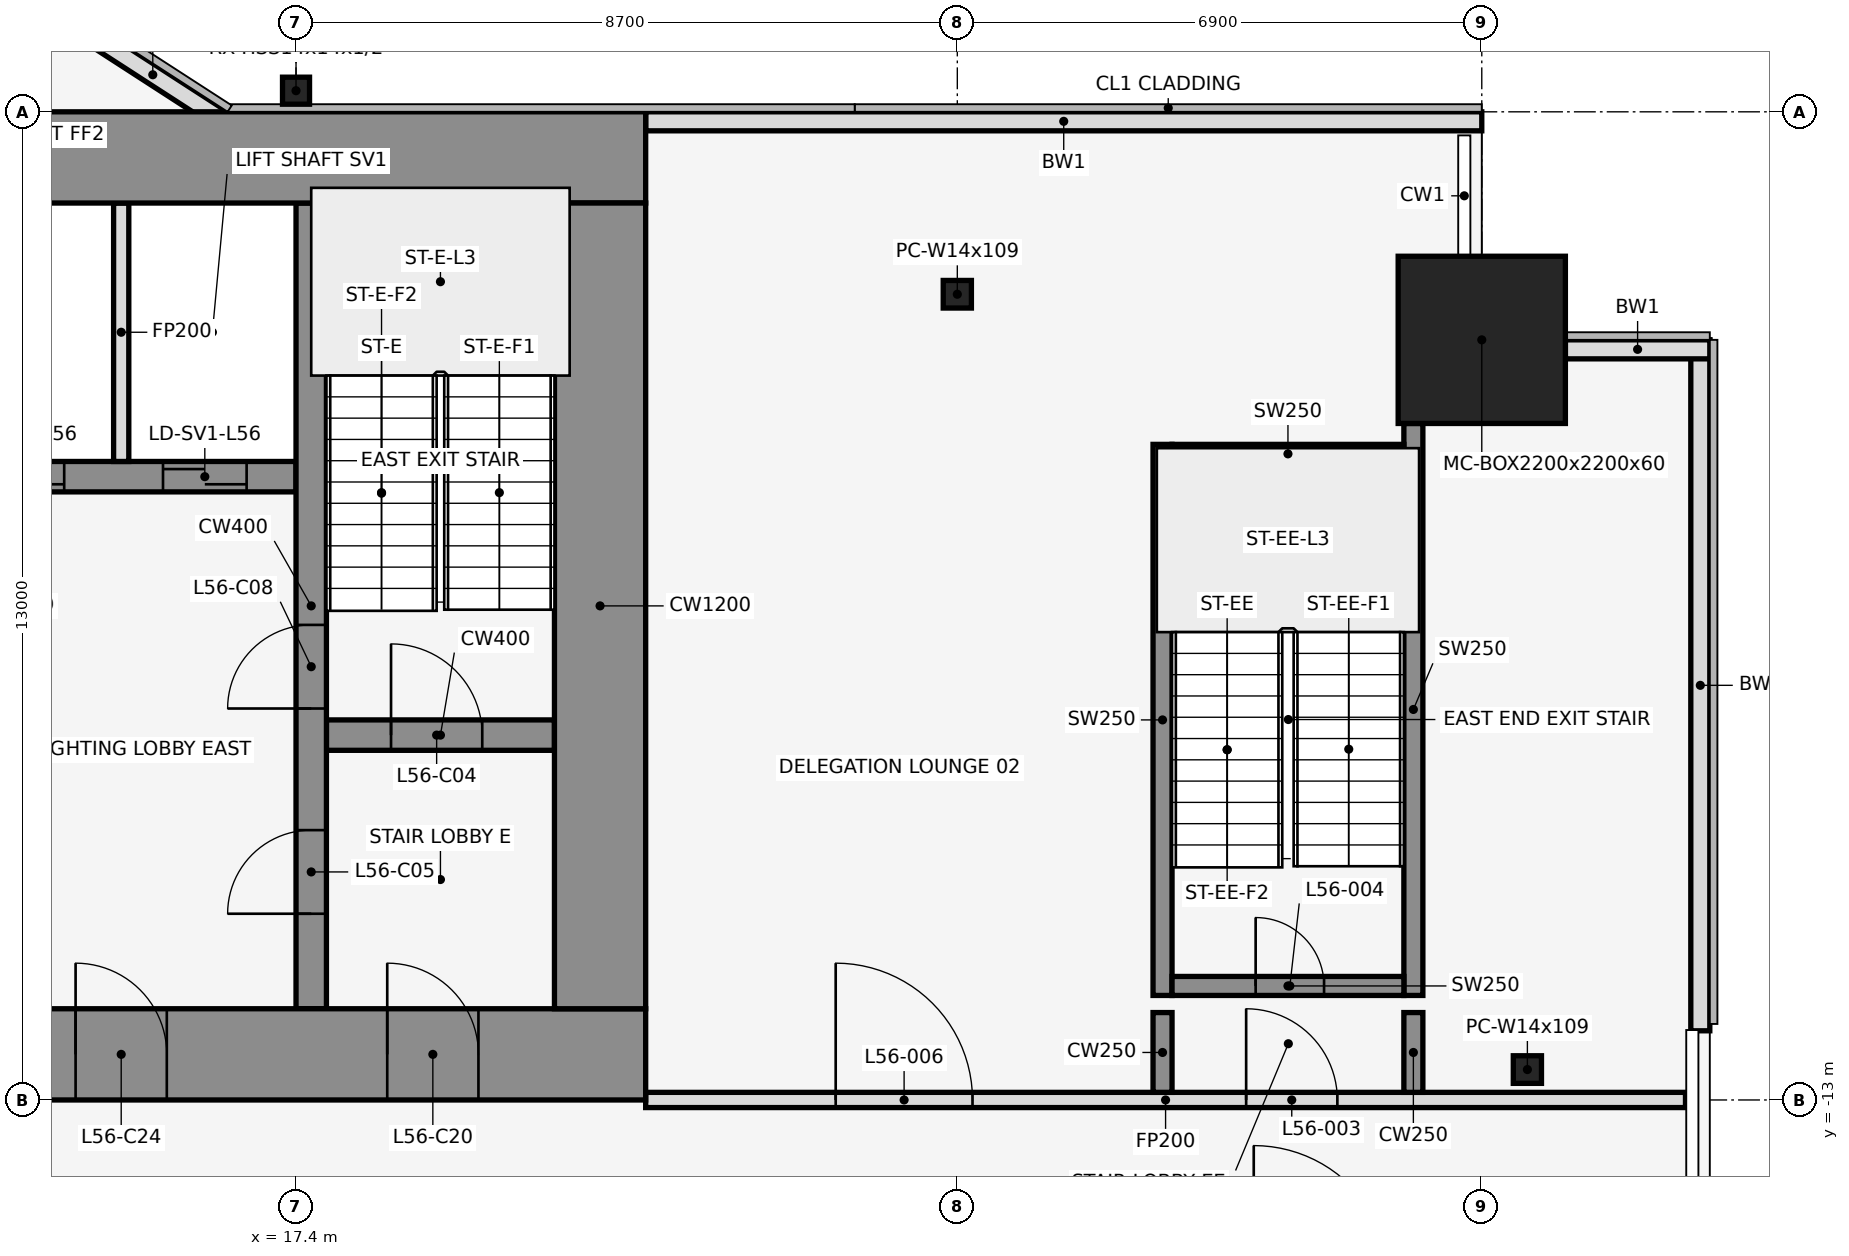
"""IFC4 building model, lengths in metres.
Left out: names, types, materials, properties, quantities, classifications, styles, units other than length and angle.
Written with IfcOpenShell. Run it as: python <this file> out.ifc"""

import sys

from ifc_helpers import new_model, si_unit, direction, frame, frame_2d, origin, origin_2d, place, context, subcontext, project, spatial, rectangle, hollow_rectangle, i_section, extrude, element, fill, save


model = new_model("IFC4")
c1 = context("Model", 3, precision=1e-05, world=origin(), true_north=direction((0.0, 1.0)))
c2 = subcontext(c1, "Body", "Model", "MODEL_VIEW")
j1 = project(units=[si_unit("LENGTHUNIT", "METRE"), si_unit("PLANEANGLEUNIT", "RADIAN")], contexts=[c1])
p1 = place(None, origin())
s1 = spatial("IfcSite", under=j1, at=p1, CompositionType="ELEMENT")
p2 = place(p1, origin())
s2 = spatial("IfcBuilding", under=s1, at=p2, CompositionType="ELEMENT")
p3 = place(p2, frame((0.0, 0.0, 249.8)))
s3 = spatial("IfcBuildingStorey", under=s2, at=p3, CompositionType="ELEMENT", Elevation=249.8)
p4 = place(p3, frame((26.1, -2.4, 0.0), z_axis=(0.0, 0.0, 1.0), x_axis=(1.0, 0.0, 0.0)))
e1 = element("IfcColumn", 1, at=p4, inside=s3, PredefinedType="COLUMN", context=c2, shape_type="SweptSolid", body=[
    extrude(i_section(OverallWidth=0.371, OverallDepth=0.363, WebThickness=0.013, FlangeThickness=0.022, at=origin_2d()), origin(), (0.0, 0.0, 1.0), 4.2),
])
p5 = place(p3, frame((33.0, -3.0, 0.0), z_axis=(0.0, 0.0, 1.0), x_axis=(1.0, 0.0, 0.0)))
e2 = element("IfcColumn", 2, at=p5, inside=s3, PredefinedType="COLUMN", context=c2, shape_type="SweptSolid", body=[
    extrude(hollow_rectangle(XDim=2.2, YDim=2.2, WallThickness=0.06, at=origin_2d()), origin(), (0.0, 0.0, 1.0), 4.2),
])
p6 = place(p3, frame((17.4, 0.278, 0.0), z_axis=(0.0, 0.0, 1.0), x_axis=(1.0, 0.0, 0.0)))
e3 = element("IfcColumn", 3, at=p6, inside=s3, PredefinedType="COLUMN", context=c2, shape_type="SweptSolid", body=[
    extrude(hollow_rectangle(XDim=0.356, YDim=0.356, WallThickness=0.012, at=origin_2d()), origin(), (0.0, 0.0, 1.0), 4.2),
])
p7 = place(p3, frame((33.6, -12.6, 0.0), z_axis=(0.0, 0.0, 1.0), x_axis=(1.0, 0.0, 0.0)))
e4 = element("IfcColumn", 4, at=p7, inside=s3, PredefinedType="COLUMN", context=c2, shape_type="SweptSolid", body=[
    extrude(i_section(OverallWidth=0.371, OverallDepth=0.363, WebThickness=0.013, FlangeThickness=0.022, at=origin_2d()), origin(), (0.0, 0.0, 1.0), 4.2),
])
p8 = place(p3, frame((33.0, -0.125, 0.0), z_axis=(0.0, 0.0, 1.0), x_axis=(-1.0, 0.0, 0.0)))
e5 = element("IfcWall", 5, at=p8, inside=s3, PredefinedType="STANDARD", context=c2, shape_type="SweptSolid", body=[
    extrude(rectangle(XDim=11.0, YDim=0.25, at=frame_2d((5.5, 0.0))), origin(), (0.0, 0.0, 1.0), 4.05),
])
p9 = place(p3, frame((16.432, -0.105, 0.0), z_axis=(0.0, 0.0, 1.0), x_axis=(-0.83981312244, 0.542875602121, 0.0)))
e6 = element("IfcWall", 6, at=p9, inside=s3, PredefinedType="STANDARD", context=c2, shape_type="SweptSolid", body=[
    extrude(rectangle(XDim=2.183, YDim=0.25, at=frame_2d((1.091, 0.0))), origin(), (0.0, 0.0, 1.0), 4.05),
])
p10 = place(p3, frame((35.875, -12.09, 0.0), z_axis=(0.0, 0.0, 1.0), x_axis=(0.0, 1.0, 0.0)))
e7 = element("IfcWall", 7, at=p10, inside=s3, PredefinedType="STANDARD", context=c2, shape_type="SweptSolid", body=[
    extrude(rectangle(XDim=9.09, YDim=0.25, at=frame_2d((4.545, 0.0))), origin(), (0.0, 0.0, 1.0), 4.05),
])
p11 = place(p3, frame((36.0, -3.125, 0.0), z_axis=(0.0, 0.0, 1.0), x_axis=(-1.0, 0.0, 0.0)))
e8 = element("IfcWall", 8, at=p11, inside=s3, PredefinedType="STANDARD", context=c2, shape_type="SweptSolid", body=[
    extrude(rectangle(XDim=1.9, YDim=0.25, at=frame_2d((0.95, 0.0))), origin(), (0.0, 0.0, 1.0), 4.05),
])
p12 = place(p3, frame((28.8, -11.625, 0.0), z_axis=(0.0, 0.0, 1.0), x_axis=(0.0, 1.0, 0.0)))
e9 = element("IfcWall", 9, at=p12, inside=s3, PredefinedType="SHEAR", context=c2, shape_type="SweptSolid", body=[
    extrude(rectangle(XDim=7.25, YDim=0.25, at=frame_2d((3.625, 0.0))), origin(), (0.0, 0.0, 1.0), 4.2),
])
p13 = place(p3, frame((32.1, -11.625, 0.0), z_axis=(0.0, 0.0, 1.0), x_axis=(0.0, 1.0, 0.0)))
e10 = element("IfcWall", 10, at=p13, inside=s3, PredefinedType="SHEAR", context=c2, shape_type="SweptSolid", body=[
    extrude(rectangle(XDim=7.525, YDim=0.25, at=frame_2d((3.762, 0.0))), origin(), (0.0, 0.0, 1.0), 4.2),
])
p14 = place(p3, frame((28.925, -11.5, 0.0), z_axis=(0.0, 0.0, 1.0), x_axis=(1.0, 0.0, 0.0)))
e11 = element("IfcWall", 11, at=p14, inside=s3, PredefinedType="SHEAR", context=c2, shape_type="SweptSolid", body=[
    extrude(rectangle(XDim=3.05, YDim=0.25, at=frame_2d((1.525, 0.0))), origin(), (0.0, 0.0, 1.0), 4.2),
])
p15 = place(p14, frame((1.1, 0.0, 0.0)))
e12 = element("IfcOpeningElement", 12, at=p15, cuts=e11, PredefinedType="OPENING", context=c2, shape_type="SweptSolid", body=[
    extrude(rectangle(XDim=0.9, YDim=2.1, at=frame_2d((0.45, 1.05))), frame((0.0, 0.137, 0.0), z_axis=(0.0, -1.0, 0.0), x_axis=(1.0, 0.0, 0.0)), (0.0, 0.0, 1.0), 0.274),
])
p16 = place(p3, frame((28.925, -4.5, 0.0), z_axis=(0.0, 0.0, 1.0), x_axis=(1.0, 0.0, 0.0)))
e13 = element("IfcWall", 13, at=p16, inside=s3, PredefinedType="SHEAR", context=c2, shape_type="SweptSolid", body=[
    extrude(rectangle(XDim=3.05, YDim=0.25, at=frame_2d((1.525, 0.0))), origin(), (0.0, 0.0, 1.0), 4.2),
])
p17 = place(p3, frame((22.0, -13.0, 0.0), z_axis=(0.0, 0.0, 1.0), x_axis=(1.0, 0.0, 0.0)))
e14 = element("IfcWall", 14, at=p17, inside=s3, PredefinedType="PARTITIONING", context=c2, shape_type="SweptSolid", body=[
    extrude(rectangle(XDim=13.68, YDim=0.2, at=frame_2d((6.84, 0.0))), origin(), (0.0, 0.0, 1.0), 3.039),
])
p18 = place(p17, frame((7.9, 0.0, 0.0)))
e15 = element("IfcOpeningElement", 15, at=p18, cuts=e14, PredefinedType="OPENING", context=c2, shape_type="SweptSolid", body=[
    extrude(rectangle(XDim=1.2, YDim=2.1, at=frame_2d((0.6, 1.05))), frame((0.0, 0.112, 0.0), z_axis=(0.0, -1.0, 0.0), x_axis=(1.0, 0.0, 0.0)), (0.0, 0.0, 1.0), 0.224),
])
p19 = place(p17, frame((2.5, 0.0, 0.0)))
e16 = element("IfcOpeningElement", 16, at=p19, cuts=e14, PredefinedType="OPENING", context=c2, shape_type="SweptSolid", body=[
    extrude(rectangle(XDim=1.8, YDim=2.1, at=frame_2d((0.9, 1.05))), frame((0.0, 0.112, 0.0), z_axis=(0.0, -1.0, 0.0), x_axis=(1.0, 0.0, 0.0)), (0.0, 0.0, 1.0), 0.224),
])
for number, where, z_axis, x_axis in (
    (17, (28.8, -12.9, 0.0), (0.0, 0.0, 1.0), (0.0, 1.0, 0.0)),
    (18, (32.1, -12.9, 0.0), (0.0, 0.0, 1.0), (0.0, 1.0, 0.0)),
):
    element("IfcWall", number, at=place(p3, frame(where, z_axis=z_axis, x_axis=x_axis)), inside=s3, PredefinedType="SHEAR", context=c2, shape_type="SweptSolid", body=[
        extrude(rectangle(XDim=1.05, YDim=0.25, at=frame_2d((0.525, 0.0))), origin(), (0.0, 0.0, 1.0), 4.2),
    ])
p20 = place(p3, frame((17.8, -8.2, 0.0), z_axis=(0.0, 0.0, 1.0), x_axis=(1.0, 0.0, 0.0)))
e19 = element("IfcWall", 19, at=p20, inside=s3, PredefinedType="SHEAR", context=c2, shape_type="SweptSolid", body=[
    extrude(rectangle(XDim=3.0, YDim=0.4, at=frame_2d((1.5, 0.0))), origin(), (0.0, 0.0, 1.0), 4.2),
])
p21 = place(p20, frame((0.85, 0.0, 0.0)))
e20 = element("IfcOpeningElement", 20, at=p21, cuts=e19, PredefinedType="OPENING", context=c2, shape_type="SweptSolid", body=[
    extrude(rectangle(XDim=1.2, YDim=2.1, at=frame_2d((0.6, 1.05))), frame((0.0, 0.212, 0.0), z_axis=(0.0, -1.0, 0.0), x_axis=(1.0, 0.0, 0.0)), (0.0, 0.0, 1.0), 0.424),
])
p22 = place(p3, frame((3.8, -4.8, 0.0), z_axis=(0.0, 0.0, 1.0), x_axis=(1.0, 0.0, 0.0)))
e21 = element("IfcWall", 21, at=p22, inside=s3, PredefinedType="SHEAR", context=c2, shape_type="SweptSolid", body=[
    extrude(rectangle(XDim=13.6, YDim=0.4, at=frame_2d((6.8, 0.0))), origin(), (0.0, 0.0, 1.0), 4.2),
])
p23 = place(p22, frame((0.75, 0.0, 0.0)))
e22 = element("IfcOpeningElement", 22, at=p23, cuts=e21, PredefinedType="OPENING", context=c2, shape_type="SweptSolid", body=[
    extrude(rectangle(XDim=1.2, YDim=2.1, at=frame_2d((0.6, 1.05))), frame((0.0, 0.212, 0.0), z_axis=(0.0, -1.0, 0.0), x_axis=(1.0, 0.0, 0.0)), (0.0, 0.0, 1.0), 0.424),
])
p24 = place(p22, frame((3.65, 0.0, 0.0)))
e23 = element("IfcOpeningElement", 23, at=p24, cuts=e21, PredefinedType="OPENING", context=c2, shape_type="SweptSolid", body=[
    extrude(rectangle(XDim=1.2, YDim=2.1, at=frame_2d((0.6, 1.05))), frame((0.0, 0.212, 0.0), z_axis=(0.0, -1.0, 0.0), x_axis=(1.0, 0.0, 0.0)), (0.0, 0.0, 1.0), 0.424),
])
p25 = place(p22, frame((6.65, 0.0, 0.0)))
e24 = element("IfcOpeningElement", 24, at=p25, cuts=e21, PredefinedType="OPENING", context=c2, shape_type="SweptSolid", body=[
    extrude(rectangle(XDim=1.2, YDim=2.1, at=frame_2d((0.6, 1.05))), frame((0.0, 0.212, 0.0), z_axis=(0.0, -1.0, 0.0), x_axis=(1.0, 0.0, 0.0)), (0.0, 0.0, 1.0), 0.424),
])
p26 = place(p22, frame((9.45, 0.0, 0.0)))
e25 = element("IfcOpeningElement", 25, at=p26, cuts=e21, PredefinedType="OPENING", context=c2, shape_type="SweptSolid", body=[
    extrude(rectangle(XDim=1.1, YDim=2.1, at=frame_2d((0.55, 1.05))), frame((0.0, 0.212, 0.0), z_axis=(0.0, -1.0, 0.0), x_axis=(1.0, 0.0, 0.0)), (0.0, 0.0, 1.0), 0.424),
])
p27 = place(p22, frame((11.85, 0.0, 0.0)))
e26 = element("IfcOpeningElement", 26, at=p27, cuts=e21, PredefinedType="OPENING", context=c2, shape_type="SweptSolid", body=[
    extrude(rectangle(XDim=1.1, YDim=2.1, at=frame_2d((0.55, 1.05))), frame((0.0, 0.212, 0.0), z_axis=(0.0, -1.0, 0.0), x_axis=(1.0, 0.0, 0.0)), (0.0, 0.0, 1.0), 0.424),
])
p28 = place(p3, frame((15.1, -4.6, 0.0), z_axis=(0.0, 0.0, 1.0), x_axis=(0.0, 1.0, 0.0)))
e27 = element("IfcWall", 27, at=p28, inside=s3, PredefinedType="PARTITIONING", context=c2, shape_type="SweptSolid", body=[
    extrude(rectangle(XDim=3.4, YDim=0.2, at=frame_2d((1.7, 0.0))), origin(), (0.0, 0.0, 1.0), 3.039),
])
p29 = place(p3, frame((17.6, -11.8, 0.0), z_axis=(0.0, 0.0, 1.0), x_axis=(0.0, 1.0, 0.0)))
e28 = element("IfcWall", 28, at=p29, inside=s3, PredefinedType="SHEAR", context=c2, shape_type="SweptSolid", body=[
    extrude(rectangle(XDim=10.6, YDim=0.4, at=frame_2d((5.3, 0.0))), origin(), (0.0, 0.0, 1.0), 4.2),
])
p30 = place(p29, frame((1.25, 0.0, 0.0)))
e29 = element("IfcOpeningElement", 29, at=p30, cuts=e28, PredefinedType="OPENING", context=c2, shape_type="SweptSolid", body=[
    extrude(rectangle(XDim=1.1, YDim=2.1, at=frame_2d((0.55, 1.05))), frame((0.0, 0.212, 0.0), z_axis=(0.0, -1.0, 0.0), x_axis=(1.0, 0.0, 0.0)), (0.0, 0.0, 1.0), 0.424),
])
p31 = place(p29, frame((3.95, 0.0, 0.0)))
e30 = element("IfcOpeningElement", 30, at=p31, cuts=e28, PredefinedType="OPENING", context=c2, shape_type="SweptSolid", body=[
    extrude(rectangle(XDim=1.1, YDim=2.1, at=frame_2d((0.55, 1.05))), frame((0.0, 0.212, 0.0), z_axis=(0.0, -1.0, 0.0), x_axis=(1.0, 0.0, 0.0)), (0.0, 0.0, 1.0), 0.424),
])
p32 = place(p3, frame((-22.0, -0.6, 0.0), z_axis=(0.0, 0.0, 1.0), x_axis=(1.0, 0.0, 0.0)))
e31 = element("IfcWall", 31, at=p32, inside=s3, PredefinedType="SHEAR", context=c2, shape_type="SweptSolid", body=[
    extrude(rectangle(XDim=44.0, YDim=1.2, at=frame_2d((22.0, 0.0))), origin(), (0.0, 0.0, 1.0), 4.2),
])
p33 = place(p32, frame((18.55, 0.0, 0.0)))
e32 = element("IfcOpeningElement", 32, at=p33, cuts=e31, PredefinedType="OPENING", context=c2, shape_type="SweptSolid", body=[
    extrude(rectangle(XDim=0.9, YDim=2.1, at=frame_2d((0.45, 1.05))), frame((0.0, 0.612, 0.0), z_axis=(0.0, -1.0, 0.0), x_axis=(1.0, 0.0, 0.0)), (0.0, 0.0, 1.0), 1.224),
])
p34 = place(p32, frame((24.55, 0.0, 0.0)))
e33 = element("IfcOpeningElement", 33, at=p34, cuts=e31, PredefinedType="OPENING", context=c2, shape_type="SweptSolid", body=[
    extrude(rectangle(XDim=0.9, YDim=2.1, at=frame_2d((0.45, 1.05))), frame((0.0, 0.612, 0.0), z_axis=(0.0, -1.0, 0.0), x_axis=(1.0, 0.0, 0.0)), (0.0, 0.0, 1.0), 1.224),
])
p35 = place(p3, frame((-22.0, -12.4, 0.0), z_axis=(0.0, 0.0, 1.0), x_axis=(1.0, 0.0, 0.0)))
e34 = element("IfcWall", 34, at=p35, inside=s3, PredefinedType="SHEAR", context=c2, shape_type="SweptSolid", body=[
    extrude(rectangle(XDim=44.0, YDim=1.2, at=frame_2d((22.0, 0.0))), origin(), (0.0, 0.0, 1.0), 4.2),
])
p36 = place(p35, frame((2.2, 0.0, 0.0)))
e35 = element("IfcOpeningElement", 35, at=p36, cuts=e34, PredefinedType="OPENING", context=c2, shape_type="SweptSolid", body=[
    extrude(rectangle(XDim=1.2, YDim=2.1, at=frame_2d((0.6, 1.05))), frame((0.0, 0.612, 0.0), z_axis=(0.0, -1.0, 0.0), x_axis=(1.0, 0.0, 0.0)), (0.0, 0.0, 1.0), 1.224),
])
p37 = place(p35, frame((21.4, 0.0, 0.0)))
e36 = element("IfcOpeningElement", 36, at=p37, cuts=e34, PredefinedType="OPENING", context=c2, shape_type="SweptSolid", body=[
    extrude(rectangle(XDim=1.2, YDim=2.1, at=frame_2d((0.6, 1.05))), frame((0.0, 0.612, 0.0), z_axis=(0.0, -1.0, 0.0), x_axis=(1.0, 0.0, 0.0)), (0.0, 0.0, 1.0), 1.224),
])
p38 = place(p35, frame((40.6, 0.0, 0.0)))
e37 = element("IfcOpeningElement", 37, at=p38, cuts=e34, PredefinedType="OPENING", context=c2, shape_type="SweptSolid", body=[
    extrude(rectangle(XDim=1.2, YDim=2.1, at=frame_2d((0.6, 1.05))), frame((0.0, 0.612, 0.0), z_axis=(0.0, -1.0, 0.0), x_axis=(1.0, 0.0, 0.0)), (0.0, 0.0, 1.0), 1.224),
])
p39 = place(p35, frame((16.0, 0.0, 0.0)))
e38 = element("IfcOpeningElement", 38, at=p39, cuts=e34, PredefinedType="OPENING", context=c2, shape_type="SweptSolid", body=[
    extrude(rectangle(XDim=1.8, YDim=2.1, at=frame_2d((0.9, 1.05))), frame((0.0, 0.612, 0.0), z_axis=(0.0, -1.0, 0.0), x_axis=(1.0, 0.0, 0.0)), (0.0, 0.0, 1.0), 1.224),
])
p40 = place(p35, frame((6.3, 0.0, 0.0)))
e39 = element("IfcOpeningElement", 39, at=p40, cuts=e34, PredefinedType="OPENING", context=c2, shape_type="SweptSolid", body=[
    extrude(rectangle(XDim=1.2, YDim=2.1, at=frame_2d((0.6, 1.05))), frame((0.0, 0.612, 0.0), z_axis=(0.0, -1.0, 0.0), x_axis=(1.0, 0.0, 0.0)), (0.0, 0.0, 1.0), 1.224),
])
p41 = place(p35, frame((26.2, 0.0, 0.0)))
e40 = element("IfcOpeningElement", 40, at=p41, cuts=e34, PredefinedType="OPENING", context=c2, shape_type="SweptSolid", body=[
    extrude(rectangle(XDim=1.8, YDim=2.1, at=frame_2d((0.9, 1.05))), frame((0.0, 0.612, 0.0), z_axis=(0.0, -1.0, 0.0), x_axis=(1.0, 0.0, 0.0)), (0.0, 0.0, 1.0), 1.224),
])
p42 = place(p35, frame((36.5, 0.0, 0.0)))
e41 = element("IfcOpeningElement", 41, at=p42, cuts=e34, PredefinedType="OPENING", context=c2, shape_type="SweptSolid", body=[
    extrude(rectangle(XDim=1.2, YDim=2.1, at=frame_2d((0.6, 1.05))), frame((0.0, 0.612, 0.0), z_axis=(0.0, -1.0, 0.0), x_axis=(1.0, 0.0, 0.0)), (0.0, 0.0, 1.0), 1.224),
])
p43 = place(p3, frame((21.4, -11.8, 0.0), z_axis=(0.0, 0.0, 1.0), x_axis=(0.0, 1.0, 0.0)))
e42 = element("IfcWall", 42, at=p43, inside=s3, PredefinedType="SHEAR", context=c2, shape_type="SweptSolid", body=[
    extrude(rectangle(XDim=10.6, YDim=1.2, at=frame_2d((5.3, 0.0))), origin(), (0.0, 0.0, 1.0), 4.2),
])
p44 = place(p18, origin())
e43 = element("IfcDoor", 43, at=p44, inside=s3, OperationType="SINGLE_SWING_RIGHT", PredefinedType="DOOR", context=c2, shape_type="SweptSolid", body=[
    extrude(rectangle(XDim=1.2, YDim=2.1, at=frame_2d((0.6, 1.05))), frame((0.0, 0.025, 0.0), z_axis=(0.0, -1.0, 0.0), x_axis=(1.0, 0.0, 0.0)), (0.0, 0.0, 1.0), 0.05),
])
fill(e15, e43)
p45 = place(p15, origin())
e44 = element("IfcDoor", 44, at=p45, inside=s3, OperationType="SINGLE_SWING_LEFT", PredefinedType="DOOR", context=c2, shape_type="SweptSolid", body=[
    extrude(rectangle(XDim=0.9, YDim=2.1, at=frame_2d((0.45, 1.05))), frame((0.0, 0.025, 0.0), z_axis=(0.0, -1.0, 0.0), x_axis=(1.0, 0.0, 0.0)), (0.0, 0.0, 1.0), 0.05),
])
fill(e12, e44)
p46 = place(p19, origin())
e45 = element("IfcDoor", 45, at=p46, inside=s3, OperationType="SINGLE_SWING_LEFT", PredefinedType="DOOR", context=c2, shape_type="SweptSolid", body=[
    extrude(rectangle(XDim=1.8, YDim=2.1, at=frame_2d((0.9, 1.05))), frame((0.0, 0.025, 0.0), z_axis=(0.0, -1.0, 0.0), x_axis=(1.0, 0.0, 0.0)), (0.0, 0.0, 1.0), 0.05),
])
fill(e16, e45)
p47 = place(p21, origin())
e46 = element("IfcDoor", 46, at=p47, inside=s3, OperationType="SINGLE_SWING_RIGHT", PredefinedType="DOOR", context=c2, shape_type="SweptSolid", body=[
    extrude(rectangle(XDim=1.2, YDim=2.1, at=frame_2d((0.6, 1.05))), frame((0.0, 0.025, 0.0), z_axis=(0.0, -1.0, 0.0), x_axis=(1.0, 0.0, 0.0)), (0.0, 0.0, 1.0), 0.05),
])
fill(e20, e46)
p48 = place(p30, origin())
e47 = element("IfcDoor", 47, at=p48, inside=s3, OperationType="SINGLE_SWING_LEFT", PredefinedType="DOOR", context=c2, shape_type="SweptSolid", body=[
    extrude(rectangle(XDim=1.1, YDim=2.1, at=frame_2d((0.55, 1.05))), frame((0.0, 0.025, 0.0), z_axis=(0.0, -1.0, 0.0), x_axis=(1.0, 0.0, 0.0)), (0.0, 0.0, 1.0), 0.05),
])
fill(e29, e47)
p49 = place(p26, origin())
e48 = element("IfcDoor", 48, at=p49, inside=s3, OperationType="DOUBLE_DOOR_SLIDING", PredefinedType="DOOR", context=c2, shape_type="SweptSolid", body=[
    extrude(rectangle(XDim=1.1, YDim=2.1, at=frame_2d((0.55, 1.05))), frame((0.0, 0.025, 0.0), z_axis=(0.0, -1.0, 0.0), x_axis=(1.0, 0.0, 0.0)), (0.0, 0.0, 1.0), 0.05),
])
fill(e25, e48)
p50 = place(p27, origin())
e49 = element("IfcDoor", 49, at=p50, inside=s3, OperationType="DOUBLE_DOOR_SLIDING", PredefinedType="DOOR", context=c2, shape_type="SweptSolid", body=[
    extrude(rectangle(XDim=1.1, YDim=2.1, at=frame_2d((0.55, 1.05))), frame((0.0, 0.025, 0.0), z_axis=(0.0, -1.0, 0.0), x_axis=(1.0, 0.0, 0.0)), (0.0, 0.0, 1.0), 0.05),
])
fill(e26, e49)
p51 = place(p31, origin())
e50 = element("IfcDoor", 50, at=p51, inside=s3, OperationType="SINGLE_SWING_RIGHT", PredefinedType="DOOR", context=c2, shape_type="SweptSolid", body=[
    extrude(rectangle(XDim=1.1, YDim=2.1, at=frame_2d((0.55, 1.05))), frame((0.0, 0.025, 0.0), z_axis=(0.0, -1.0, 0.0), x_axis=(1.0, 0.0, 0.0)), (0.0, 0.0, 1.0), 0.05),
])
fill(e30, e50)
p52 = place(p38, frame((1.2, 0.0, 0.0), z_axis=(0.0, 0.0, 1.0), x_axis=(-1.0, 0.0, 0.0)))
e51 = element("IfcDoor", 51, at=p52, inside=s3, OperationType="SINGLE_SWING_RIGHT", PredefinedType="DOOR", context=c2, shape_type="SweptSolid", body=[
    extrude(rectangle(XDim=1.2, YDim=2.1, at=frame_2d((0.6, 1.05))), frame((0.0, 0.025, 0.0), z_axis=(0.0, -1.0, 0.0), x_axis=(1.0, 0.0, 0.0)), (0.0, 0.0, 1.0), 0.05),
])
fill(e37, e51)
p53 = place(p42, frame((1.2, 0.0, 0.0), z_axis=(0.0, 0.0, 1.0), x_axis=(-1.0, 0.0, 0.0)))
e52 = element("IfcDoor", 52, at=p53, inside=s3, OperationType="SINGLE_SWING_RIGHT", PredefinedType="DOOR", context=c2, shape_type="SweptSolid", body=[
    extrude(rectangle(XDim=1.2, YDim=2.1, at=frame_2d((0.6, 1.05))), frame((0.0, 0.025, 0.0), z_axis=(0.0, -1.0, 0.0), x_axis=(1.0, 0.0, 0.0)), (0.0, 0.0, 1.0), 0.05),
])
fill(e41, e52)
save(model, sys.argv[1])
